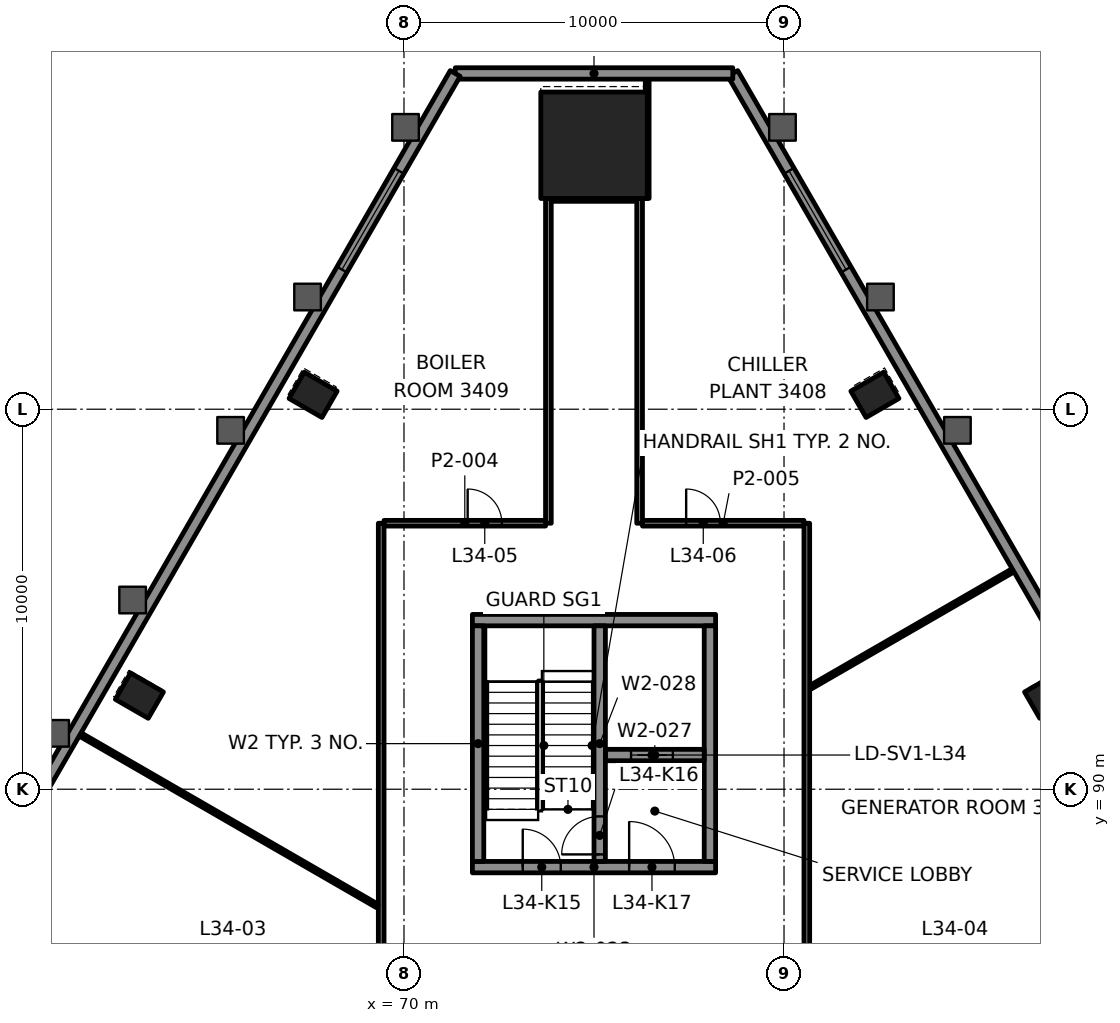
"""IFC4 building model, lengths in metres.
Left out: names, types, materials, properties, quantities, classifications, styles, units other than length and angle.
Written with IfcOpenShell. Run it as: python <this file> out.ifc"""

import sys

from ifc_helpers import new_model, si_unit, direction, frame, frame_2d, origin, origin_2d, place, context, subcontext, project, spatial, rectangle, hollow_rectangle, extrude, element, fill, save


model = new_model("IFC4")
c1 = context("Model", 3, precision=1e-05, world=origin(), true_north=direction((0.0, 1.0)))
c2 = subcontext(c1, "Body", "Model", "MODEL_VIEW")
j1 = project(units=[si_unit("LENGTHUNIT", "METRE"), si_unit("PLANEANGLEUNIT", "RADIAN")], contexts=[c1])
p1 = place(None, origin())
s1 = spatial("IfcSite", under=j1, at=p1, CompositionType="ELEMENT")
p2 = place(p1, origin())
s2 = spatial("IfcBuilding", under=s1, at=p2, CompositionType="ELEMENT")
p3 = place(p2, frame((0.0, 0.0, 151.3)))
s3 = spatial("IfcBuildingStorey", under=s2, at=p3, CompositionType="ELEMENT", Elevation=151.3)
p4 = place(p3, frame((75.0, 106.946, 0.0), z_axis=(0.0, 0.0, 1.0), x_axis=(-1.0, 0.0, 0.0)))
e1 = element("IfcColumn", 1, at=p4, inside=s3, PredefinedType="COLUMN", context=c2, shape_type="SweptSolid", body=[
    extrude(rectangle(XDim=2.8, YDim=2.8, at=origin_2d()), origin(), (0.0, 0.0, 1.0), 4.5),
])
for number, where, z_axis, x_axis in (
    (2, (86.962, 92.462, -0.0), (0.0, 0.0, 1.0), (-0.5, 0.866, 0.0)),
    (3, (82.391, 100.379, -0.0), (0.0, 0.0, 1.0), (-0.5, 0.866, 0.0)),
    (4, (67.609, 100.379, -0.0), (0.0, 0.0, 1.0), (-0.5, -0.866, 0.0)),
    (5, (63.038, 92.462, -0.0), (0.0, 0.0, 1.0), (-0.5, -0.866, 0.0)),
):
    element("IfcColumn", number, at=place(p3, frame(where, z_axis=z_axis, x_axis=x_axis)), inside=s3, PredefinedType="COLUMN", context=c2, shape_type="SweptSolid", body=[
        extrude(hollow_rectangle(XDim=0.8, YDim=1.0, WallThickness=0.05, at=origin_2d()), origin(), (0.0, 0.0, 1.0), 4.5),
    ])
p5 = place(p3, frame((71.8, 87.95, 0.0), z_axis=(0.0, 0.0, 1.0), x_axis=(1.0, 0.0, 0.0)))
e6 = element("IfcWall", 6, at=p5, inside=s3, PredefinedType="SHEAR", context=c2, shape_type="SweptSolid", body=[
    extrude(rectangle(XDim=6.4, YDim=0.3, at=frame_2d((3.2, 0.0))), origin(), (0.0, 0.0, 1.0), 4.3),
])
p6 = place(p5, frame((1.325, 0.0, 0.0)))
e7 = element("IfcOpeningElement", 7, at=p6, cuts=e6, PredefinedType="OPENING", context=c2, shape_type="SweptSolid", body=[
    extrude(rectangle(XDim=1.0, YDim=2.1, at=frame_2d((0.5, 1.05))), frame((0.0, 0.16, 0.0), z_axis=(0.0, -1.0, 0.0), x_axis=(1.0, 0.0, 0.0)), (0.0, 0.0, 1.0), 0.32),
])
p7 = place(p5, frame((4.125, 0.0, 0.0)))
e8 = element("IfcOpeningElement", 8, at=p7, cuts=e6, PredefinedType="OPENING", context=c2, shape_type="SweptSolid", body=[
    extrude(rectangle(XDim=1.2, YDim=2.1, at=frame_2d((0.6, 1.05))), frame((0.0, 0.16, 0.0), z_axis=(0.0, -1.0, 0.0), x_axis=(1.0, 0.0, 0.0)), (0.0, 0.0, 1.0), 0.32),
])
p8 = place(p3, frame((71.8, 94.45, 0.0), z_axis=(0.0, 0.0, 1.0), x_axis=(1.0, 0.0, 0.0)))
e9 = element("IfcWall", 9, at=p8, inside=s3, PredefinedType="SHEAR", context=c2, shape_type="SweptSolid", body=[
    extrude(rectangle(XDim=6.4, YDim=0.3, at=frame_2d((3.2, 0.0))), origin(), (0.0, 0.0, 1.0), 4.3),
])
for number, where, z_axis, x_axis in (
    (10, (71.95, 88.1, 0.0), (0.0, 0.0, 1.0), (0.0, 1.0, 0.0)),
    (11, (78.05, 88.1, 0.0), (0.0, 0.0, 1.0), (0.0, 1.0, 0.0)),
):
    element("IfcWall", number, at=place(p3, frame(where, z_axis=z_axis, x_axis=x_axis)), inside=s3, PredefinedType="SHEAR", context=c2, shape_type="SweptSolid", body=[
        extrude(rectangle(XDim=6.2, YDim=0.3, at=frame_2d((3.1, 0.0))), origin(), (0.0, 0.0, 1.0), 4.3),
    ])
p9 = place(p3, frame((75.3, 90.9, 0.0), z_axis=(0.0, 0.0, 1.0), x_axis=(1.0, 0.0, 0.0)))
e12 = element("IfcWall", 12, at=p9, inside=s3, PredefinedType="SHEAR", context=c2, shape_type="SweptSolid", body=[
    extrude(rectangle(XDim=2.6, YDim=0.3, at=frame_2d((1.3, 0.0))), origin(), (0.0, 0.0, 1.0), 4.3),
])
p10 = place(p9, frame((0.675, 0.0, 0.0)))
e13 = element("IfcOpeningElement", 13, at=p10, cuts=e12, PredefinedType="OPENING", context=c2, shape_type="SweptSolid", body=[
    extrude(rectangle(XDim=1.1, YDim=2.1, at=frame_2d((0.55, 1.05))), frame((0.0, 0.16, 0.0), z_axis=(0.0, -1.0, 0.0), x_axis=(1.0, 0.0, 0.0)), (0.0, 0.0, 1.0), 0.32),
])
p11 = place(p3, frame((75.15, 88.1, 0.0), z_axis=(0.0, 0.0, 1.0), x_axis=(0.0, 1.0, 0.0)))
e14 = element("IfcWall", 14, at=p11, inside=s3, PredefinedType="SHEAR", context=c2, shape_type="SweptSolid", body=[
    extrude(rectangle(XDim=6.2, YDim=0.3, at=frame_2d((3.1, 0.0))), origin(), (0.0, 0.0, 1.0), 4.3),
])
p12 = place(p11, frame((0.185, 0.0, 0.0)))
e15 = element("IfcOpeningElement", 15, at=p12, cuts=e14, PredefinedType="OPENING", context=c2, shape_type="SweptSolid", body=[
    extrude(rectangle(XDim=1.0, YDim=2.1, at=frame_2d((0.5, 1.05))), frame((0.0, 0.16, 0.0), z_axis=(0.0, -1.0, 0.0), x_axis=(1.0, 0.0, 0.0)), (0.0, 0.0, 1.0), 0.32),
])
p13 = place(p3, frame((69.476, 97.0, 0.0), z_axis=(0.0, 0.0, 1.0), x_axis=(1.0, 0.0, 0.0)))
e16 = element("IfcWall", 16, at=p13, inside=s3, PredefinedType="PARTITIONING", context=c2, shape_type="SweptSolid", body=[
    extrude(rectangle(XDim=4.25, YDim=0.15, at=frame_2d((2.125, 0.0))), origin(), (0.0, 0.0, 1.0), 3.7),
])
p14 = place(p13, frame((2.2, 0.0, 0.0)))
e17 = element("IfcOpeningElement", 17, at=p14, cuts=e16, PredefinedType="OPENING", context=c2, shape_type="SweptSolid", body=[
    extrude(rectangle(XDim=0.9, YDim=2.1, at=frame_2d((0.45, 1.05))), frame((0.0, 0.085, 0.0), z_axis=(0.0, -1.0, 0.0), x_axis=(1.0, 0.0, 0.0)), (0.0, 0.0, 1.0), 0.17),
])
p15 = place(p3, frame((76.275, 97.0, 0.0), z_axis=(0.0, 0.0, 1.0), x_axis=(1.0, 0.0, 0.0)))
e18 = element("IfcWall", 18, at=p15, inside=s3, PredefinedType="PARTITIONING", context=c2, shape_type="SweptSolid", body=[
    extrude(rectangle(XDim=4.25, YDim=0.15, at=frame_2d((2.125, 0.0))), origin(), (0.0, 0.0, 1.0), 3.7),
])
p16 = place(p15, frame((1.15, 0.0, 0.0)))
e19 = element("IfcOpeningElement", 19, at=p16, cuts=e18, PredefinedType="OPENING", context=c2, shape_type="SweptSolid", body=[
    extrude(rectangle(XDim=0.9, YDim=2.1, at=frame_2d((0.45, 1.05))), frame((0.0, 0.085, 0.0), z_axis=(0.0, -1.0, 0.0), x_axis=(1.0, 0.0, 0.0)), (0.0, 0.0, 1.0), 0.17),
])
p17 = place(p3, frame((73.875, 105.546, 0.0), z_axis=(0.0, 0.0, 1.0), x_axis=(1.0, 0.0, 0.0)))
e20 = element("IfcWall", 20, at=p17, inside=s3, PredefinedType="PARTITIONING", context=c2, shape_type="SweptSolid", body=[
    extrude(rectangle(XDim=2.244, YDim=0.15, at=frame_2d((1.122, 0.0))), origin(), (0.0, 0.0, 1.0), 3.7),
])
p18 = place(p3, frame((80.701, 92.686, 0.0), z_axis=(0.0, 0.0, 1.0), x_axis=(0.866025438137, 0.4999999405, 0.0)))
e21 = element("IfcWall", 21, at=p18, inside=s3, PredefinedType="PARTITIONING", context=c2, shape_type="SweptSolid", body=[
    extrude(rectangle(XDim=6.271, YDim=0.1, at=frame_2d((3.135, 0.0))), origin(), (0.0, 0.0, 1.0), 3.7),
])
p19 = place(p3, frame((80.6, 85.4, 0.0), z_axis=(0.0, 0.0, 1.0), x_axis=(0.0, 1.0, 0.0)))
e22 = element("IfcWall", 22, at=p19, inside=s3, PredefinedType="PARTITIONING", context=c2, shape_type="SweptSolid", body=[
    extrude(rectangle(XDim=11.6, YDim=0.15, at=frame_2d((5.8, 0.0))), origin(), (0.0, 0.0, 1.0), 3.7),
])
p20 = place(p3, frame((76.4, 105.547, 0.0), z_axis=(0.0, 0.0, 1.0), x_axis=(0.0, 1.0, 0.0)))
e23 = element("IfcWall", 23, at=p20, inside=s3, PredefinedType="PARTITIONING", context=c2, shape_type="SweptSolid", body=[
    extrude(rectangle(XDim=3.26, YDim=0.1, at=frame_2d((1.63, 0.0))), origin(), (0.0, 0.0, 1.0), 3.7),
])
p21 = place(p3, frame((76.2, 97.0, 0.0), z_axis=(0.0, 0.0, 1.0), x_axis=(0.0, 1.0, 0.0)))
e24 = element("IfcWall", 24, at=p21, inside=s3, PredefinedType="PARTITIONING", context=c2, shape_type="SweptSolid", body=[
    extrude(rectangle(XDim=8.546, YDim=0.15, at=frame_2d((4.273, 0.0))), origin(), (0.0, 0.0, 1.0), 3.7),
])
p22 = place(p3, frame((73.8, 97.0, 0.0), z_axis=(0.0, 0.0, 1.0), x_axis=(0.0, 1.0, 0.0)))
e25 = element("IfcWall", 25, at=p22, inside=s3, PredefinedType="PARTITIONING", context=c2, shape_type="SweptSolid", body=[
    extrude(rectangle(XDim=8.546, YDim=0.15, at=frame_2d((4.273, 0.0))), origin(), (0.0, 0.0, 1.0), 3.7),
])
p23 = place(p3, frame((69.4, 85.4, 0.0), z_axis=(0.0, 0.0, 1.0), x_axis=(0.0, 1.0, 0.0)))
e26 = element("IfcWall", 26, at=p23, inside=s3, PredefinedType="PARTITIONING", context=c2, shape_type="SweptSolid", body=[
    extrude(rectangle(XDim=11.6, YDim=0.15, at=frame_2d((5.8, 0.0))), origin(), (0.0, 0.0, 1.0), 3.7),
])
p24 = place(p3, frame((69.299, 86.928, 0.0), z_axis=(0.0, 0.0, 1.0), x_axis=(-0.866030953628, 0.499990387265, 0.0)))
e27 = element("IfcWall", 27, at=p24, inside=s3, PredefinedType="PARTITIONING", context=c2, shape_type="SweptSolid", body=[
    extrude(rectangle(XDim=9.15, YDim=0.1, at=frame_2d((4.575, 0.0))), origin(), (0.0, 0.0, 1.0), 3.7),
])
p25 = place(p3, frame((106.129, 61.245, 0.0), z_axis=(0.0, 0.0, 1.0), x_axis=(-0.500000750612, 0.866024970418, 0.0)))
e28 = element("IfcWall", 28, at=p25, inside=s3, PredefinedType="SOLIDWALL", context=c2, shape_type="SweptSolid", body=[
    extrude(rectangle(XDim=54.954, YDim=0.3, at=frame_2d((27.477, 0.0))), origin(), (0.0, 0.0, 1.0), 4.3),
])
p26 = place(p25, frame((2.96, 0.0, 0.8)))
e29 = element("IfcOpeningElement", 29, at=p26, cuts=e28, PredefinedType="OPENING", context=c2, shape_type="SweptSolid", body=[
    extrude(rectangle(XDim=3.0, YDim=2.4, at=frame_2d((1.5, 1.2))), frame((0.0, 0.16, 0.0), z_axis=(0.0, -1.0, 0.0), x_axis=(1.0, 0.0, 0.0)), (0.0, 0.0, 1.0), 0.32),
])
p27 = place(p25, frame((48.994, 0.0, 0.8)))
e30 = element("IfcOpeningElement", 30, at=p27, cuts=e28, PredefinedType="OPENING", context=c2, shape_type="SweptSolid", body=[
    extrude(rectangle(XDim=3.0, YDim=2.4, at=frame_2d((1.5, 1.2))), frame((0.0, 0.16, 0.0), z_axis=(0.0, -1.0, 0.0), x_axis=(1.0, 0.0, 0.0)), (0.0, 0.0, 1.0), 0.32),
])
p28 = place(p3, frame((78.652, 108.836, 0.0), z_axis=(0.0, 0.0, 1.0), x_axis=(-1.0, 0.0, 0.0)))
e31 = element("IfcWall", 31, at=p28, inside=s3, PredefinedType="SOLIDWALL", context=c2, shape_type="SweptSolid", body=[
    extrude(rectangle(XDim=7.304, YDim=0.3, at=frame_2d((3.652, 0.0))), origin(), (0.0, 0.0, 1.0), 4.3),
])
p29 = place(p3, frame((71.348, 108.836, 0.0), z_axis=(0.0, 0.0, 1.0), x_axis=(-0.500000750612, -0.866024970418, 0.0)))
e32 = element("IfcWall", 32, at=p29, inside=s3, PredefinedType="SOLIDWALL", context=c2, shape_type="SweptSolid", body=[
    extrude(rectangle(XDim=54.954, YDim=0.3, at=frame_2d((27.477, 0.0))), origin(), (0.0, 0.0, 1.0), 4.3),
])
p30 = place(p29, frame((2.96, 0.0, 0.8)))
e33 = element("IfcOpeningElement", 33, at=p30, cuts=e32, PredefinedType="OPENING", context=c2, shape_type="SweptSolid", body=[
    extrude(rectangle(XDim=3.0, YDim=2.4, at=frame_2d((1.5, 1.2))), frame((0.0, 0.16, 0.0), z_axis=(0.0, -1.0, 0.0), x_axis=(1.0, 0.0, 0.0)), (0.0, 0.0, 1.0), 0.32),
])
p31 = place(p29, frame((48.994, 0.0, 0.8)))
e34 = element("IfcOpeningElement", 34, at=p31, cuts=e32, PredefinedType="OPENING", context=c2, shape_type="SweptSolid", body=[
    extrude(rectangle(XDim=3.0, YDim=2.4, at=frame_2d((1.5, 1.2))), frame((0.0, 0.16, 0.0), z_axis=(0.0, -1.0, 0.0), x_axis=(1.0, 0.0, 0.0)), (0.0, 0.0, 1.0), 0.32),
])
p32 = place(p14, origin())
e35 = element("IfcDoor", 35, at=p32, inside=s3, OperationType="SINGLE_SWING_RIGHT", PredefinedType="DOOR", context=c2, shape_type="SweptSolid", body=[
    extrude(rectangle(XDim=0.9, YDim=2.1, at=frame_2d((0.45, 1.05))), frame((0.0, 0.025, 0.0), z_axis=(0.0, -1.0, 0.0), x_axis=(1.0, 0.0, 0.0)), (0.0, 0.0, 1.0), 0.05),
])
fill(e17, e35)
p33 = place(p16, origin())
e36 = element("IfcDoor", 36, at=p33, inside=s3, OperationType="SINGLE_SWING_LEFT", PredefinedType="DOOR", context=c2, shape_type="SweptSolid", body=[
    extrude(rectangle(XDim=0.9, YDim=2.1, at=frame_2d((0.45, 1.05))), frame((0.0, 0.025, 0.0), z_axis=(0.0, -1.0, 0.0), x_axis=(1.0, 0.0, 0.0)), (0.0, 0.0, 1.0), 0.05),
])
fill(e19, e36)
p34 = place(p27, origin())
e37 = element("IfcWindow", 37, at=p34, inside=s3, PartitioningType="SINGLE_PANEL", PredefinedType="WINDOW", context=c2, shape_type="SweptSolid", body=[
    extrude(rectangle(XDim=3.0, YDim=2.4, at=frame_2d((1.5, 1.2))), frame((0.0, 0.03, 0.0), z_axis=(0.0, -1.0, 0.0), x_axis=(1.0, 0.0, 0.0)), (0.0, 0.0, 1.0), 0.06),
])
fill(e30, e37)
p35 = place(p30, origin())
e38 = element("IfcWindow", 38, at=p35, inside=s3, PartitioningType="SINGLE_PANEL", PredefinedType="WINDOW", context=c2, shape_type="SweptSolid", body=[
    extrude(rectangle(XDim=3.0, YDim=2.4, at=frame_2d((1.5, 1.2))), frame((0.0, 0.03, 0.0), z_axis=(0.0, -1.0, 0.0), x_axis=(1.0, 0.0, 0.0)), (0.0, 0.0, 1.0), 0.06),
])
fill(e33, e38)
p36 = place(p10, origin())
e39 = element("IfcDoor", 39, at=p36, inside=s3, OperationType="DOUBLE_DOOR_SLIDING", PredefinedType="DOOR", context=c2, shape_type="SweptSolid", body=[
    extrude(rectangle(XDim=1.1, YDim=2.1, at=frame_2d((0.55, 1.05))), frame((0.0, 0.025, 0.0), z_axis=(0.0, -1.0, 0.0), x_axis=(1.0, 0.0, 0.0)), (0.0, 0.0, 1.0), 0.05),
])
fill(e13, e39)
p37 = place(p6, origin())
e40 = element("IfcDoor", 40, at=p37, inside=s3, OperationType="SINGLE_SWING_RIGHT", PredefinedType="DOOR", context=c2, shape_type="SweptSolid", body=[
    extrude(rectangle(XDim=1.0, YDim=2.1, at=frame_2d((0.5, 1.05))), frame((0.0, 0.025, 0.0), z_axis=(0.0, -1.0, 0.0), x_axis=(1.0, 0.0, 0.0)), (0.0, 0.0, 1.0), 0.05),
])
fill(e7, e40)
p38 = place(p12, origin())
e41 = element("IfcDoor", 41, at=p38, inside=s3, OperationType="SINGLE_SWING_LEFT", PredefinedType="DOOR", context=c2, shape_type="SweptSolid", body=[
    extrude(rectangle(XDim=1.0, YDim=2.1, at=frame_2d((0.5, 1.05))), frame((0.0, 0.025, 0.0), z_axis=(0.0, -1.0, 0.0), x_axis=(1.0, 0.0, 0.0)), (0.0, 0.0, 1.0), 0.05),
])
fill(e15, e41)
p39 = place(p7, origin())
e42 = element("IfcDoor", 42, at=p39, inside=s3, OperationType="SINGLE_SWING_RIGHT", PredefinedType="DOOR", context=c2, shape_type="SweptSolid", body=[
    extrude(rectangle(XDim=1.2, YDim=2.1, at=frame_2d((0.6, 1.05))), frame((0.0, 0.025, 0.0), z_axis=(0.0, -1.0, 0.0), x_axis=(1.0, 0.0, 0.0)), (0.0, 0.0, 1.0), 0.05),
])
fill(e8, e42)
save(model, sys.argv[1])
